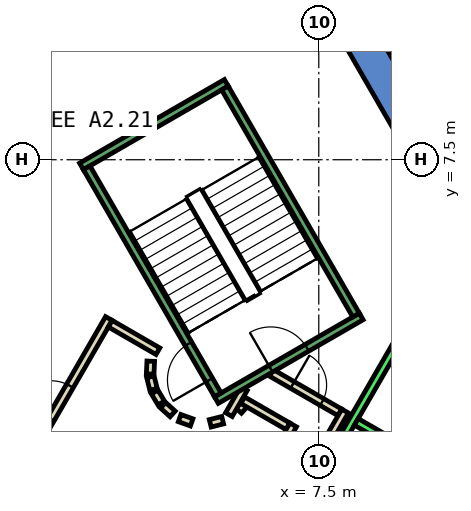
"""IFC4 building model, lengths in metres.
Left out: names, types, materials, properties, quantities, classifications, styles, units other than length and angle.
Written with IfcOpenShell. Run it as: python <this file> out.ifc"""

import sys

from ifc_helpers import new_model, si_unit, direction, frame, frame_2d, origin, place, context, subcontext, project, spatial, polyline, rectangle, outline, extrude, element, fill, save


model = new_model("IFC4")
c1 = context("Model", 3, precision=1e-05, world=origin(), true_north=direction((0.0, 1.0)))
c2 = subcontext(c1, "Body", "Model", "MODEL_VIEW")
j1 = project(units=[si_unit("LENGTHUNIT", "METRE"), si_unit("PLANEANGLEUNIT", "RADIAN")], contexts=[c1])
p1 = place(None, origin())
s1 = spatial("IfcSite", under=j1, at=p1, CompositionType="ELEMENT")
p2 = place(p1, origin())
s2 = spatial("IfcBuilding", under=s1, at=p2, CompositionType="ELEMENT")
p3 = place(p2, frame((0.0, 0.0, 99.2)))
s3 = spatial("IfcBuildingStorey", under=s2, at=p3, CompositionType="ELEMENT", Elevation=99.2)
p4 = place(p3, frame((0.0, 0.0, -0.4)))
e1 = element("IfcWall", 1, at=p4, inside=s3, PredefinedType="SHEAR", context=c2, shape_type="SweptSolid", body=[
    extrude(outline(polyline([(8.517, 11.748), (7.738, 11.298), (12.817, 2.5), (13.856, 2.5), (8.517, 11.748)])), origin(), (0.0, 0.0, 1.0), 4.2),
])
p5 = place(p3, frame((5.39, 0.898, 0.0), z_axis=(0.0, 0.0, 1.0), x_axis=(0.673828488714, 0.738887791073, 0.0)))
e2 = element("IfcWall", 2, at=p5, inside=s3, PredefinedType="PARTITIONING", context=c2, shape_type="SweptSolid", body=[
    extrude(rectangle(XDim=0.263, YDim=0.2, at=frame_2d((0.131, 0.0))), origin(), (0.0, 0.0, 1.0), 3.8),
])
p6 = place(p3, frame((5.499, 1.172, 0.0), z_axis=(0.0, 0.0, 1.0), x_axis=(0.866333505267, -0.499465972466, 0.0)))
e3 = element("IfcWall", 3, at=p6, inside=s3, PredefinedType="PARTITIONING", context=c2, shape_type="SweptSolid", body=[
    extrude(rectangle(XDim=1.374, YDim=0.2, at=frame_2d((0.687, 0.0))), origin(), (0.0, 0.0, 1.0), 3.8),
])
p7 = place(p3, frame((6.826, 0.522, 0.0), z_axis=(0.0, 0.0, 1.0), x_axis=(-0.500016722714, -0.866015748706, 0.0)))
e4 = element("IfcWall", 4, at=p7, inside=s3, PredefinedType="PARTITIONING", context=c2, shape_type="SweptSolid", body=[
    extrude(rectangle(XDim=1.7, YDim=0.2, at=frame_2d((0.85, 0.0))), origin(), (0.0, 0.0, 1.0), 3.8),
])
p8 = place(p3, frame((6.25, 1.894, 0.0), z_axis=(0.0, 0.0, 1.0), x_axis=(0.866043184279, -0.499969202016, 0.0)))
e5 = element("IfcWall", 5, at=p8, inside=s3, PredefinedType="PARTITIONING", context=c2, shape_type="SweptSolid", body=[
    extrude(rectangle(XDim=2.084, YDim=0.2, at=frame_2d((1.042, 0.0))), origin(), (0.0, 0.0, 1.0), 3.8),
])
p9 = place(p8, frame((0.642, 0.0, 0.0)))
e6 = element("IfcOpeningElement", 6, at=p9, cuts=e5, PredefinedType="OPENING", context=c2, shape_type="SweptSolid", body=[
    extrude(rectangle(XDim=0.9, YDim=2.1, at=frame_2d((0.45, 1.05))), frame((0.0, 0.11, 0.0), z_axis=(0.0, -1.0, 0.0), x_axis=(1.0, 0.0, 0.0)), (0.0, 0.0, 1.0), 0.22),
])
p10 = place(p3, frame((8.192, 0.888, 0.0), z_axis=(0.0, 0.0, 1.0), x_axis=(-0.499940625693, -0.866059680843, 0.0)))
e7 = element("IfcWall", 7, at=p10, inside=s3, PredefinedType="PARTITIONING", context=c2, shape_type="SweptSolid", body=[
    extrude(rectangle(XDim=2.68, YDim=0.2, at=frame_2d((1.34, 0.0))), origin(), (0.0, 0.0, 1.0), 3.8),
])
p11 = place(p3, frame((5.135, 0.793, 0.0), z_axis=(0.0, 0.0, 1.0), x_axis=(0.499526442893, 0.866298639529, 0.0)))
e8 = element("IfcWall", 8, at=p11, inside=s3, PredefinedType="PARTITIONING", context=c2, shape_type="SweptSolid", body=[
    extrude(rectangle(XDim=0.791, YDim=0.2, at=frame_2d((0.396, 0.0))), origin(), (0.0, 0.0, 1.0), 3.8),
])
p12 = place(p3, frame((-0.52, -1.0, 0.0), z_axis=(0.0, 0.0, 1.0), x_axis=(0.50011622646, 0.865958290007, 0.0)))
e9 = element("IfcWall", 9, at=p12, inside=s3, PredefinedType="PARTITIONING", context=c2, shape_type="SweptSolid", body=[
    extrude(rectangle(XDim=4.991, YDim=0.2, at=frame_2d((2.496, 0.0))), origin(), (0.0, 0.0, 1.0), 3.8),
])
p13 = place(p12, frame((1.945, 0.0, 0.0)))
e10 = element("IfcOpeningElement", 10, at=p13, cuts=e9, PredefinedType="OPENING", context=c2, shape_type="SweptSolid", body=[
    extrude(rectangle(XDim=1.0, YDim=2.1, at=frame_2d((0.5, 1.05))), frame((0.0, 0.11, 0.0), z_axis=(0.0, -1.0, 0.0), x_axis=(1.0, 0.0, 0.0)), (0.0, 0.0, 1.0), 0.22),
])
p14 = place(p3, frame((2.012, 3.186, 0.0), z_axis=(0.0, 0.0, 1.0), x_axis=(0.865891012941, -0.500232699559, 0.0)))
e11 = element("IfcWall", 11, at=p14, inside=s3, PredefinedType="PARTITIONING", context=c2, shape_type="SweptSolid", body=[
    extrude(rectangle(XDim=1.449, YDim=0.2, at=frame_2d((0.725, 0.0))), origin(), (0.0, 0.0, 1.0), 3.8),
])
p15 = place(p3, frame((3.079, 2.199, 0.0), z_axis=(0.0, 0.0, 1.0), x_axis=(-0.047771483479, -0.998858290933, 0.0)))
e12 = element("IfcWall", 12, at=p15, inside=s3, PredefinedType="PARTITIONING", context=c2, shape_type="SweptSolid", body=[
    extrude(rectangle(XDim=0.337, YDim=0.2, at=frame_2d((0.169, 0.0))), origin(), (0.0, 0.0, 1.0), 3.8),
])
p16 = place(p3, frame((3.07, 1.786, 0.0), z_axis=(0.0, 0.0, 1.0), x_axis=(0.242705583207, -0.970099994784, 0.0)))
e13 = element("IfcWall", 13, at=p16, inside=s3, PredefinedType="PARTITIONING", context=c2, shape_type="SweptSolid", body=[
    extrude(rectangle(XDim=0.338, YDim=0.2, at=frame_2d((0.169, 0.0))), origin(), (0.0, 0.0, 1.0), 3.8),
])
for number, where, z_axis, x_axis in (
    (14, (3.182, 1.388, 0.0), (0.0, 0.0, 1.0), (0.512, -0.859, 0.0)),
    (15, (3.404, 1.039, 0.0), (0.0, 0.0, 1.0), (0.74, -0.672, 0.0)),
):
    element("IfcWall", number, at=place(p3, frame(where, z_axis=z_axis, x_axis=x_axis)), inside=s3, PredefinedType="PARTITIONING", context=c2, shape_type="SweptSolid", body=[
        extrude(rectangle(XDim=0.338, YDim=0.2, at=frame_2d((0.169, 0.0))), origin(), (0.0, 0.0, 1.0), 3.8),
    ])
p17 = place(p3, frame((3.838, 0.702, 0.0), z_axis=(0.0, 0.0, 1.0), x_axis=(0.941035081519, -0.338308993895, 0.0)))
e16 = element("IfcWall", 16, at=p17, inside=s3, PredefinedType="PARTITIONING", context=c2, shape_type="SweptSolid", body=[
    extrude(rectangle(XDim=0.337, YDim=0.2, at=frame_2d((0.168, 0.0))), origin(), (0.0, 0.0, 1.0), 3.8),
])
p18 = place(p3, frame((4.644, 0.564, 0.0), z_axis=(0.0, 0.0, 1.0), x_axis=(0.969929076366, 0.243387729394, 0.0)))
e17 = element("IfcWall", 17, at=p18, inside=s3, PredefinedType="PARTITIONING", context=c2, shape_type="SweptSolid", body=[
    extrude(rectangle(XDim=0.337, YDim=0.2, at=frame_2d((0.168, 0.0))), origin(), (0.0, 0.0, 1.0), 3.8),
])
p19 = place(p3, frame((4.451, -6.19, 0.0), z_axis=(0.0, 0.0, 1.0), x_axis=(0.50000090737, 0.866024879913, 0.0)))
e18 = element("IfcWall", 18, at=p19, inside=s3, PredefinedType="STANDARD", context=c2, shape_type="SweptSolid", body=[
    extrude(rectangle(XDim=10.6, YDim=0.2, at=frame_2d((5.3, 0.0))), origin(), (0.0, 0.0, 1.0), 3.8),
])
p20 = place(p3, frame((8.488, 0.602, 0.0), z_axis=(0.0, 0.0, 1.0), x_axis=(0.866022959057, -0.500004234368, 0.0)))
e19 = element("IfcWall", 19, at=p20, inside=s3, PredefinedType="STANDARD", context=c2, shape_type="SweptSolid", body=[
    extrude(rectangle(XDim=2.5, YDim=0.2, at=frame_2d((1.25, 0.0))), origin(), (0.0, 0.0, 1.0), 3.8),
])
p21 = place(p3, frame((4.806, 1.176, 0.0), z_axis=(0.0, 0.0, 1.0), x_axis=(0.866059941101, 0.499940174841, 0.0)))
e20 = element("IfcWall", 20, at=p21, inside=s3, PredefinedType="STANDARD", context=c2, shape_type="SweptSolid", body=[
    extrude(rectangle(XDim=4.4, YDim=0.2, at=frame_2d((2.2, 0.0))), origin(), (0.0, 0.0, 1.0), 3.8),
])
p22 = place(p21, frame((1.65, 0.0, 0.0)))
e21 = element("IfcOpeningElement", 21, at=p22, cuts=e20, PredefinedType="OPENING", context=c2, shape_type="SweptSolid", body=[
    extrude(rectangle(XDim=1.1, YDim=2.2, at=frame_2d((0.55, 1.1))), frame((0.0, 0.11, 0.0), z_axis=(0.0, -1.0, 0.0), x_axis=(1.0, 0.0, 0.0)), (0.0, 0.0, 1.0), 0.22),
])
p23 = place(p3, frame((1.256, 7.324, 0.0), z_axis=(0.0, 0.0, 1.0), x_axis=(0.866046073146, 0.499964197906, 0.0)))
e22 = element("IfcWall", 22, at=p23, inside=s3, PredefinedType="STANDARD", context=c2, shape_type="SweptSolid", body=[
    extrude(rectangle(XDim=4.4, YDim=0.2, at=frame_2d((2.2, 0.0))), origin(), (0.0, 0.0, 1.0), 3.8),
])
p24 = place(p3, frame((4.843, 1.312, 0.0), z_axis=(0.0, 0.0, 1.0), x_axis=(-0.499963383562, 0.866046543262, 0.0)))
e23 = element("IfcWall", 23, at=p24, inside=s3, PredefinedType="STANDARD", context=c2, shape_type="SweptSolid", body=[
    extrude(rectangle(XDim=6.9, YDim=0.2, at=frame_2d((3.45, 0.0))), origin(), (0.0, 0.0, 1.0), 3.8),
])
p25 = place(p24, frame((0.45, 0.0, 0.0)))
e24 = element("IfcOpeningElement", 24, at=p25, cuts=e23, PredefinedType="OPENING", context=c2, shape_type="SweptSolid", body=[
    extrude(rectangle(XDim=1.1, YDim=2.2, at=frame_2d((0.55, 1.1))), frame((0.0, 0.11, 0.0), z_axis=(0.0, -1.0, 0.0), x_axis=(1.0, 0.0, 0.0)), (0.0, 0.0, 1.0), 0.22),
])
p26 = place(p3, frame((8.48, 3.412, 0.0), z_axis=(0.0, 0.0, 1.0), x_axis=(-0.499978703459, 0.866037698999, 0.0)))
e25 = element("IfcWall", 25, at=p26, inside=s3, PredefinedType="STANDARD", context=c2, shape_type="SweptSolid", body=[
    extrude(rectangle(XDim=6.9, YDim=0.2, at=frame_2d((3.45, 0.0))), origin(), (0.0, 0.0, 1.0), 3.8),
])
p27 = place(p13, origin())
e26 = element("IfcDoor", 26, at=p27, inside=s3, OperationType="SINGLE_SWING_LEFT", PredefinedType="DOOR", context=c2, shape_type="SweptSolid", body=[
    extrude(rectangle(XDim=1.0, YDim=2.1, at=frame_2d((0.5, 1.05))), frame((0.0, 0.025, 0.0), z_axis=(0.0, -1.0, 0.0), x_axis=(1.0, 0.0, 0.0)), (0.0, 0.0, 1.0), 0.05),
])
fill(e10, e26)
p28 = place(p9, origin())
e27 = element("IfcDoor", 27, at=p28, inside=s3, OperationType="SINGLE_SWING_LEFT", PredefinedType="DOOR", context=c2, shape_type="SweptSolid", body=[
    extrude(rectangle(XDim=0.9, YDim=2.1, at=frame_2d((0.45, 1.05))), frame((0.0, 0.025, 0.0), z_axis=(0.0, -1.0, 0.0), x_axis=(1.0, 0.0, 0.0)), (0.0, 0.0, 1.0), 0.05),
])
fill(e6, e27)
p29 = place(p25, origin())
e28 = element("IfcDoor", 28, at=p29, inside=s3, OperationType="SINGLE_SWING_LEFT", PredefinedType="DOOR", context=c2, shape_type="SweptSolid", body=[
    extrude(rectangle(XDim=1.1, YDim=2.2, at=frame_2d((0.55, 1.1))), frame((0.0, 0.025, 0.0), z_axis=(0.0, -1.0, 0.0), x_axis=(1.0, 0.0, 0.0)), (0.0, 0.0, 1.0), 0.05),
])
fill(e24, e28)
p30 = place(p22, origin())
e29 = element("IfcDoor", 29, at=p30, inside=s3, OperationType="SINGLE_SWING_LEFT", PredefinedType="DOOR", context=c2, shape_type="SweptSolid", body=[
    extrude(rectangle(XDim=1.1, YDim=2.2, at=frame_2d((0.55, 1.1))), frame((0.0, 0.025, 0.0), z_axis=(0.0, -1.0, 0.0), x_axis=(1.0, 0.0, 0.0)), (0.0, 0.0, 1.0), 0.05),
])
fill(e21, e29)
save(model, sys.argv[1])
